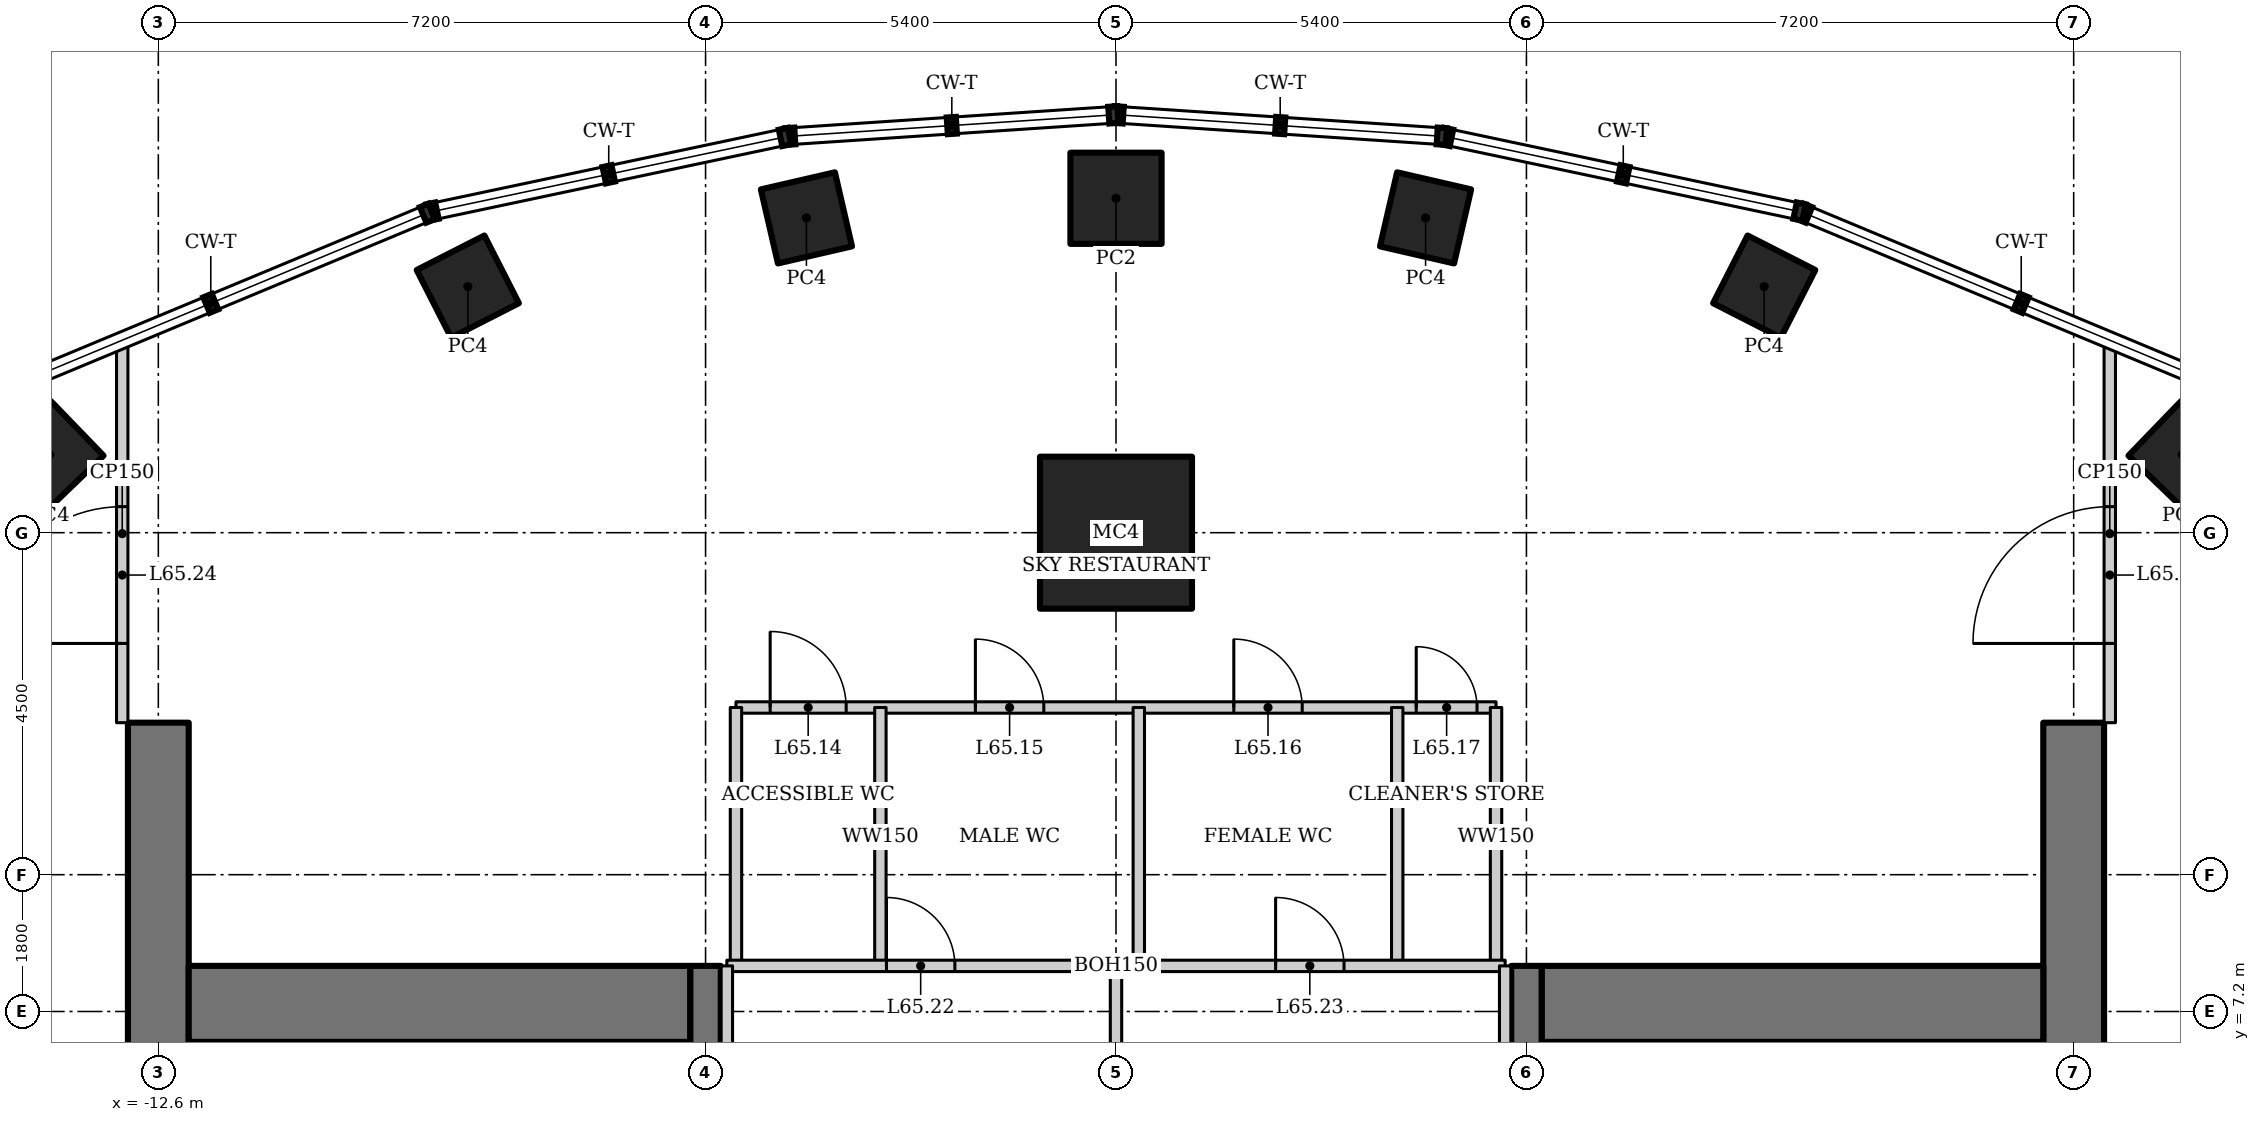
"""IFC4 building model, lengths in metres.
Left out: names, types, materials, properties, quantities, classifications, styles, units other than length and angle.
Written with IfcOpenShell. Run it as: python <this file> out.ifc"""

import sys

from ifc_helpers import new_model, si_unit, direction, frame, frame_2d, origin, origin_2d, place, context, subcontext, project, spatial, rectangle, hollow_rectangle, extrude, element, fill, save


model = new_model("IFC4")
c1 = context("Model", 3, precision=1e-05, world=origin(), true_north=direction((0.0, 1.0)))
c2 = subcontext(c1, "Body", "Model", "MODEL_VIEW")
j1 = project(units=[si_unit("LENGTHUNIT", "METRE"), si_unit("PLANEANGLEUNIT", "RADIAN")], contexts=[c1])
p1 = place(None, origin())
s1 = spatial("IfcSite", under=j1, at=p1, CompositionType="ELEMENT")
p2 = place(p1, origin())
s2 = spatial("IfcBuilding", under=s1, at=p2, CompositionType="ELEMENT")
p3 = place(p2, frame((0.0, 0.0, 279.4)))
s3 = spatial("IfcBuildingStorey", under=s2, at=p3, CompositionType="ELEMENT", Elevation=279.4)
p4 = place(p3, frame((0.0, 13.5, 0.0), z_axis=(0.0, 0.0, 1.0), x_axis=(1.0, 0.0, 0.0)))
e1 = element("IfcColumn", 1, at=p4, inside=s3, PredefinedType="COLUMN", context=c2, shape_type="SweptSolid", body=[
    extrude(hollow_rectangle(XDim=2.0, YDim=2.0, WallThickness=0.15, at=origin_2d()), origin(), (0.0, 0.0, 1.0), 5.0),
])
for number, where, z_axis, x_axis in (
    (2, (14.028, 14.526, 0.0), (0.0, 0.0, 1.0), (0.695, 0.719, 0.0)),
    (3, (8.528, 16.738, 0.0), (0.0, 0.0, 1.0), (0.454, 0.891, 0.0)),
    (4, (4.073, 17.642, 0.0), (0.0, 0.0, 1.0), (0.225, 0.974, 0.0)),
):
    element("IfcColumn", number, at=place(p3, frame(where, z_axis=z_axis, x_axis=x_axis)), inside=s3, PredefinedType="COLUMN", context=c2, shape_type="SweptSolid", body=[
        extrude(hollow_rectangle(XDim=1.0, YDim=1.0, WallThickness=0.08, at=origin_2d()), origin(), (0.0, 0.0, 1.0), 5.0),
    ])
p5 = place(p3, frame((0.0, 17.9, 0.0), z_axis=(0.0, 0.0, 1.0), x_axis=(1.0, 0.0, 0.0)))
e5 = element("IfcColumn", 5, at=p5, inside=s3, PredefinedType="COLUMN", context=c2, shape_type="SweptSolid", body=[
    extrude(hollow_rectangle(XDim=1.2, YDim=1.2, WallThickness=0.1, at=origin_2d()), origin(), (0.0, 0.0, 1.0), 5.0),
])
for number, where, z_axis, x_axis in (
    (6, (-4.073, 17.642, 0.0), (0.0, 0.0, 1.0), (0.974, 0.225, 0.0)),
    (7, (-8.528, 16.738, 0.0), (0.0, 0.0, 1.0), (0.891, 0.454, 0.0)),
    (8, (-14.028, 14.526, 0.0), (0.0, 0.0, 1.0), (0.719, 0.695, 0.0)),
):
    element("IfcColumn", number, at=place(p3, frame(where, z_axis=z_axis, x_axis=x_axis)), inside=s3, PredefinedType="COLUMN", context=c2, shape_type="SweptSolid", body=[
        extrude(hollow_rectangle(XDim=1.0, YDim=1.0, WallThickness=0.08, at=origin_2d()), origin(), (0.0, 0.0, 1.0), 5.0),
    ])
p6 = place(p3, frame((12.6, -11.0, 0.0), z_axis=(0.0, 0.0, 1.0), x_axis=(0.0, 1.0, 0.0)))
e9 = element("IfcWall", 9, at=p6, inside=s3, PredefinedType="SHEAR", context=c2, shape_type="SweptSolid", body=[
    extrude(rectangle(XDim=22.0, YDim=0.8, at=frame_2d((11.0, 0.0))), origin(), (0.0, 0.0, 1.0), 5.0),
])
p7 = place(p6, frame((10.1, 0.0, 0.0)))
e10 = element("IfcOpeningElement", 10, at=p7, cuts=e9, PredefinedType="OPENING", context=c2, shape_type="SweptSolid", body=[
    extrude(rectangle(XDim=1.8, YDim=2.1, at=frame_2d((0.9, 1.05))), frame((0.0, 0.41, 0.0), z_axis=(0.0, -1.0, 0.0), x_axis=(1.0, 0.0, 0.0)), (0.0, 0.0, 1.0), 0.82),
])
p8 = place(p3, frame((-12.6, 11.0, 0.0), z_axis=(0.0, 0.0, 1.0), x_axis=(0.0, -1.0, 0.0)))
e11 = element("IfcWall", 11, at=p8, inside=s3, PredefinedType="SHEAR", context=c2, shape_type="SweptSolid", body=[
    extrude(rectangle(XDim=22.0, YDim=0.8, at=frame_2d((11.0, 0.0))), origin(), (0.0, 0.0, 1.0), 5.0),
])
p9 = place(p8, frame((10.1, 0.0, 0.0)))
e12 = element("IfcOpeningElement", 12, at=p9, cuts=e11, PredefinedType="OPENING", context=c2, shape_type="SweptSolid", body=[
    extrude(rectangle(XDim=1.8, YDim=2.1, at=frame_2d((0.9, 1.05))), frame((0.0, 0.41, 0.0), z_axis=(0.0, -1.0, 0.0), x_axis=(1.0, 0.0, 0.0)), (0.0, 0.0, 1.0), 0.82),
])
for number, where, z_axis, x_axis in (
    (13, (12.2, 7.3, 0.0), (0.0, 0.0, 1.0), (-1.0, 0.0, 0.0)),
    (14, (-5.6, 7.3, 0.0), (0.0, 0.0, 1.0), (-1.0, 0.0, 0.0)),
):
    element("IfcWall", number, at=place(p3, frame(where, z_axis=z_axis, x_axis=x_axis)), inside=s3, PredefinedType="SHEAR", context=c2, shape_type="SweptSolid", body=[
        extrude(rectangle(XDim=6.6, YDim=1.0, at=frame_2d((3.3, 0.0))), origin(), (0.0, 0.0, 1.0), 5.0),
    ])
p10 = place(p3, frame((5.4, -6.8, 0.0), z_axis=(0.0, 0.0, 1.0), x_axis=(0.0, 1.0, 0.0)))
e15 = element("IfcWall", 15, at=p10, inside=s3, PredefinedType="SHEAR", context=c2, shape_type="SweptSolid", body=[
    extrude(rectangle(XDim=14.6, YDim=0.4, at=frame_2d((7.3, 0.0))), origin(), (0.0, 0.0, 1.0), 5.0),
])
p11 = place(p10, frame((5.9, 0.0, 0.0)))
e16 = element("IfcOpeningElement", 16, at=p11, cuts=e15, PredefinedType="OPENING", context=c2, shape_type="SweptSolid", body=[
    extrude(rectangle(XDim=1.8, YDim=2.1, at=frame_2d((0.9, 1.05))), frame((0.0, 0.21, 0.0), z_axis=(0.0, -1.0, 0.0), x_axis=(1.0, 0.0, 0.0)), (0.0, 0.0, 1.0), 0.42),
])
p12 = place(p3, frame((-5.4, 7.8, 0.0), z_axis=(0.0, 0.0, 1.0), x_axis=(0.0, -1.0, 0.0)))
e17 = element("IfcWall", 17, at=p12, inside=s3, PredefinedType="SHEAR", context=c2, shape_type="SweptSolid", body=[
    extrude(rectangle(XDim=14.6, YDim=0.4, at=frame_2d((7.3, 0.0))), origin(), (0.0, 0.0, 1.0), 5.0),
])
p13 = place(p12, frame((6.4, 0.0, 0.0)))
e18 = element("IfcOpeningElement", 18, at=p13, cuts=e17, PredefinedType="OPENING", context=c2, shape_type="SweptSolid", body=[
    extrude(rectangle(XDim=1.8, YDim=2.1, at=frame_2d((0.9, 1.05))), frame((0.0, 0.21, 0.0), z_axis=(0.0, -1.0, 0.0), x_axis=(1.0, 0.0, 0.0)), (0.0, 0.0, 1.0), 0.42),
])
p14 = place(p3, frame((-13.075, 11.0, 0.0), z_axis=(0.0, 0.0, 1.0), x_axis=(0.0, 1.0, 0.0)))
e19 = element("IfcWall", 19, at=p14, inside=s3, PredefinedType="PARTITIONING", context=c2, shape_type="SweptSolid", body=[
    extrude(rectangle(XDim=4.974, YDim=0.15, at=frame_2d((2.487, 0.0))), origin(), (0.0, 0.0, 1.0), 4.8),
])
p15 = place(p14, frame((1.043, 0.0, 0.0)))
e20 = element("IfcOpeningElement", 20, at=p15, cuts=e19, PredefinedType="OPENING", context=c2, shape_type="SweptSolid", body=[
    extrude(rectangle(XDim=1.8, YDim=2.1, at=frame_2d((0.9, 1.05))), frame((0.0, 0.085, 0.0), z_axis=(0.0, -1.0, 0.0), x_axis=(1.0, 0.0, 0.0)), (0.0, 0.0, 1.0), 0.17),
])
p16 = place(p3, frame((13.075, 11.0, 0.0), z_axis=(0.0, 0.0, 1.0), x_axis=(0.0, 1.0, 0.0)))
e21 = element("IfcWall", 21, at=p16, inside=s3, PredefinedType="PARTITIONING", context=c2, shape_type="SweptSolid", body=[
    extrude(rectangle(XDim=4.974, YDim=0.15, at=frame_2d((2.487, 0.0))), origin(), (0.0, 0.0, 1.0), 4.8),
])
p17 = place(p16, frame((1.043, 0.0, 0.0)))
e22 = element("IfcOpeningElement", 22, at=p17, cuts=e21, PredefinedType="OPENING", context=c2, shape_type="SweptSolid", body=[
    extrude(rectangle(XDim=1.8, YDim=2.1, at=frame_2d((0.9, 1.05))), frame((0.0, 0.085, 0.0), z_axis=(0.0, -1.0, 0.0), x_axis=(1.0, 0.0, 0.0)), (0.0, 0.0, 1.0), 0.17),
])
p18 = place(p3, frame((-5.0, 11.2, 0.0), z_axis=(0.0, 0.0, 1.0), x_axis=(1.0, 0.0, 0.0)))
e23 = element("IfcWall", 23, at=p18, inside=s3, PredefinedType="SOLIDWALL", context=c2, shape_type="SweptSolid", body=[
    extrude(rectangle(XDim=10.0, YDim=0.15, at=frame_2d((5.0, 0.0))), origin(), (0.0, 0.0, 1.0), 4.8),
])
p19 = place(p18, frame((0.45, 0.0, 0.0)))
e24 = element("IfcOpeningElement", 24, at=p19, cuts=e23, PredefinedType="OPENING", context=c2, shape_type="SweptSolid", body=[
    extrude(rectangle(XDim=1.0, YDim=2.1, at=frame_2d((0.5, 1.05))), frame((0.0, 0.085, 0.0), z_axis=(0.0, -1.0, 0.0), x_axis=(1.0, 0.0, 0.0)), (0.0, 0.0, 1.0), 0.17),
])
p20 = place(p18, frame((3.15, 0.0, 0.0)))
e25 = element("IfcOpeningElement", 25, at=p20, cuts=e23, PredefinedType="OPENING", context=c2, shape_type="SweptSolid", body=[
    extrude(rectangle(XDim=0.9, YDim=2.1, at=frame_2d((0.45, 1.05))), frame((0.0, 0.085, 0.0), z_axis=(0.0, -1.0, 0.0), x_axis=(1.0, 0.0, 0.0)), (0.0, 0.0, 1.0), 0.17),
])
p21 = place(p18, frame((6.55, 0.0, 0.0)))
e26 = element("IfcOpeningElement", 26, at=p21, cuts=e23, PredefinedType="OPENING", context=c2, shape_type="SweptSolid", body=[
    extrude(rectangle(XDim=0.9, YDim=2.1, at=frame_2d((0.45, 1.05))), frame((0.0, 0.085, 0.0), z_axis=(0.0, -1.0, 0.0), x_axis=(1.0, 0.0, 0.0)), (0.0, 0.0, 1.0), 0.17),
])
p22 = place(p18, frame((8.95, 0.0, 0.0)))
e27 = element("IfcOpeningElement", 27, at=p22, cuts=e23, PredefinedType="OPENING", context=c2, shape_type="SweptSolid", body=[
    extrude(rectangle(XDim=0.8, YDim=2.1, at=frame_2d((0.4, 1.05))), frame((0.0, 0.085, 0.0), z_axis=(0.0, -1.0, 0.0), x_axis=(1.0, 0.0, 0.0)), (0.0, 0.0, 1.0), 0.17),
])
for number, where, z_axis, x_axis in (
    (28, (-5.0, 7.8, 0.0), (0.0, 0.0, 1.0), (0.0, 1.0, 0.0)),
    (29, (5.0, 7.8, 0.0), (0.0, 0.0, 1.0), (0.0, 1.0, 0.0)),
    (30, (-3.1, 7.8, 0.0), (0.0, 0.0, 1.0), (0.0, 1.0, 0.0)),
):
    element("IfcWall", number, at=place(p3, frame(where, z_axis=z_axis, x_axis=x_axis)), inside=s3, PredefinedType="SOLIDWALL", context=c2, shape_type="SweptSolid", body=[
        extrude(rectangle(XDim=3.4, YDim=0.15, at=frame_2d((1.7, 0.0))), origin(), (0.0, 0.0, 1.0), 4.8),
    ])
p23 = place(p3, frame((0.3, 7.8, 0.0), z_axis=(0.0, 0.0, 1.0), x_axis=(0.0, 1.0, 0.0)))
e31 = element("IfcWall", 31, at=p23, inside=s3, PredefinedType="SOLIDWALL", context=c2, shape_type="SweptSolid", body=[
    extrude(rectangle(XDim=3.4, YDim=0.15, at=frame_2d((1.7, 0.0))), origin(), (0.0, 0.0, 1.0), 3.6),
])
p24 = place(p3, frame((3.7, 7.8, 0.0), z_axis=(0.0, 0.0, 1.0), x_axis=(0.0, 1.0, 0.0)))
e32 = element("IfcWall", 32, at=p24, inside=s3, PredefinedType="SOLIDWALL", context=c2, shape_type="SweptSolid", body=[
    extrude(rectangle(XDim=3.4, YDim=0.15, at=frame_2d((1.7, 0.0))), origin(), (0.0, 0.0, 1.0), 4.8),
])
p25 = place(p3, frame((-5.12, 7.8, 0.0), z_axis=(0.0, 0.0, 1.0), x_axis=(1.0, 0.0, 0.0)))
e33 = element("IfcWall", 33, at=p25, inside=s3, PredefinedType="PARTITIONING", context=c2, shape_type="SweptSolid", body=[
    extrude(rectangle(XDim=10.24, YDim=0.15, at=frame_2d((5.12, 0.0))), origin(), (0.0, 0.0, 1.0), 4.8),
])
p26 = place(p25, frame((2.1, 0.0, 0.0)))
e34 = element("IfcOpeningElement", 34, at=p26, cuts=e33, PredefinedType="OPENING", context=c2, shape_type="SweptSolid", body=[
    extrude(rectangle(XDim=0.9, YDim=2.1, at=frame_2d((0.45, 1.05))), frame((0.0, 0.085, 0.0), z_axis=(0.0, -1.0, 0.0), x_axis=(1.0, 0.0, 0.0)), (0.0, 0.0, 1.0), 0.17),
])
p27 = place(p25, frame((7.22, 0.0, 0.0)))
e35 = element("IfcOpeningElement", 35, at=p27, cuts=e33, PredefinedType="OPENING", context=c2, shape_type="SweptSolid", body=[
    extrude(rectangle(XDim=0.9, YDim=2.1, at=frame_2d((0.45, 1.05))), frame((0.0, 0.085, 0.0), z_axis=(0.0, -1.0, 0.0), x_axis=(1.0, 0.0, 0.0)), (0.0, 0.0, 1.0), 0.17),
])
for number, where, z_axis, x_axis in (
    (36, (-5.12, 2.6, 0.0), (0.0, 0.0, 1.0), (0.0, 1.0, 0.0)),
    (37, (5.12, 2.6, 0.0), (0.0, 0.0, 1.0), (0.0, 1.0, 0.0)),
):
    element("IfcWall", number, at=place(p3, frame(where, z_axis=z_axis, x_axis=x_axis)), inside=s3, PredefinedType="PARTITIONING", context=c2, shape_type="SweptSolid", body=[
        extrude(rectangle(XDim=5.2, YDim=0.15, at=frame_2d((2.6, 0.0))), origin(), (0.0, 0.0, 1.0), 4.8),
    ])
p28 = place(p3, frame((0.0, 2.6, 0.0), z_axis=(0.0, 0.0, 1.0), x_axis=(0.0, 1.0, 0.0)))
e38 = element("IfcWall", 38, at=p28, inside=s3, PredefinedType="PARTITIONING", context=c2, shape_type="SweptSolid", body=[
    extrude(rectangle(XDim=5.2, YDim=0.15, at=frame_2d((2.6, 0.0))), origin(), (0.0, 0.0, 1.0), 3.6),
])
p29 = place(p19, origin())
e39 = element("IfcDoor", 39, at=p29, inside=s3, OperationType="SINGLE_SWING_LEFT", PredefinedType="DOOR", context=c2, shape_type="SweptSolid", body=[
    extrude(rectangle(XDim=1.0, YDim=2.1, at=frame_2d((0.5, 1.05))), frame((0.0, 0.025, 0.0), z_axis=(0.0, -1.0, 0.0), x_axis=(1.0, 0.0, 0.0)), (0.0, 0.0, 1.0), 0.05),
])
fill(e24, e39)
p30 = place(p20, origin())
e40 = element("IfcDoor", 40, at=p30, inside=s3, OperationType="SINGLE_SWING_LEFT", PredefinedType="DOOR", context=c2, shape_type="SweptSolid", body=[
    extrude(rectangle(XDim=0.9, YDim=2.1, at=frame_2d((0.45, 1.05))), frame((0.0, 0.025, 0.0), z_axis=(0.0, -1.0, 0.0), x_axis=(1.0, 0.0, 0.0)), (0.0, 0.0, 1.0), 0.05),
])
fill(e25, e40)
p31 = place(p21, origin())
e41 = element("IfcDoor", 41, at=p31, inside=s3, OperationType="SINGLE_SWING_LEFT", PredefinedType="DOOR", context=c2, shape_type="SweptSolid", body=[
    extrude(rectangle(XDim=0.9, YDim=2.1, at=frame_2d((0.45, 1.05))), frame((0.0, 0.025, 0.0), z_axis=(0.0, -1.0, 0.0), x_axis=(1.0, 0.0, 0.0)), (0.0, 0.0, 1.0), 0.05),
])
fill(e26, e41)
p32 = place(p22, origin())
e42 = element("IfcDoor", 42, at=p32, inside=s3, OperationType="SINGLE_SWING_LEFT", PredefinedType="DOOR", context=c2, shape_type="SweptSolid", body=[
    extrude(rectangle(XDim=0.8, YDim=2.1, at=frame_2d((0.4, 1.05))), frame((0.0, 0.025, 0.0), z_axis=(0.0, -1.0, 0.0), x_axis=(1.0, 0.0, 0.0)), (0.0, 0.0, 1.0), 0.05),
])
fill(e27, e42)
p33 = place(p26, origin())
e43 = element("IfcDoor", 43, at=p33, inside=s3, OperationType="SINGLE_SWING_LEFT", PredefinedType="DOOR", context=c2, shape_type="SweptSolid", body=[
    extrude(rectangle(XDim=0.9, YDim=2.1, at=frame_2d((0.45, 1.05))), frame((0.0, 0.025, 0.0), z_axis=(0.0, -1.0, 0.0), x_axis=(1.0, 0.0, 0.0)), (0.0, 0.0, 1.0), 0.05),
])
fill(e34, e43)
p34 = place(p27, origin())
e44 = element("IfcDoor", 44, at=p34, inside=s3, OperationType="SINGLE_SWING_LEFT", PredefinedType="DOOR", context=c2, shape_type="SweptSolid", body=[
    extrude(rectangle(XDim=0.9, YDim=2.1, at=frame_2d((0.45, 1.05))), frame((0.0, 0.025, 0.0), z_axis=(0.0, -1.0, 0.0), x_axis=(1.0, 0.0, 0.0)), (0.0, 0.0, 1.0), 0.05),
])
fill(e35, e44)
p35 = place(p15, origin())
e45 = element("IfcDoor", 45, at=p35, inside=s3, OperationType="DOUBLE_DOOR_DOUBLE_SWING", PredefinedType="DOOR", context=c2, shape_type="SweptSolid", body=[
    extrude(rectangle(XDim=1.8, YDim=2.1, at=frame_2d((0.9, 1.05))), frame((0.0, 0.025, 0.0), z_axis=(0.0, -1.0, 0.0), x_axis=(1.0, 0.0, 0.0)), (0.0, 0.0, 1.0), 0.05),
])
fill(e20, e45)
p36 = place(p17, origin())
e46 = element("IfcDoor", 46, at=p36, inside=s3, OperationType="DOUBLE_DOOR_DOUBLE_SWING", PredefinedType="DOOR", context=c2, shape_type="SweptSolid", body=[
    extrude(rectangle(XDim=1.8, YDim=2.1, at=frame_2d((0.9, 1.05))), frame((0.0, 0.025, 0.0), z_axis=(0.0, -1.0, 0.0), x_axis=(1.0, 0.0, 0.0)), (0.0, 0.0, 1.0), 0.05),
])
fill(e22, e46)
save(model, sys.argv[1])
